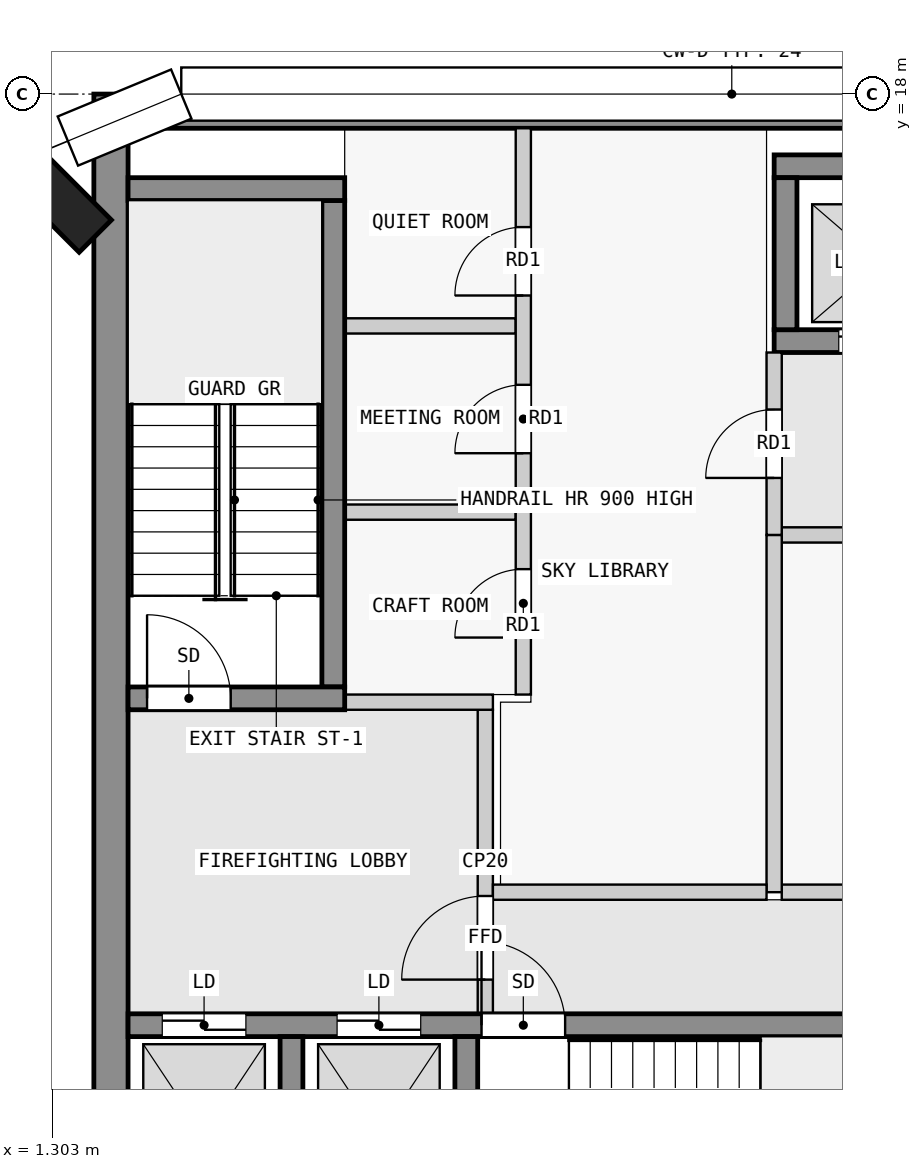
"""IFC4 building model, lengths in metres.
Left out: names, types, materials, properties, quantities, classifications, styles, units other than length and angle.
Written with IfcOpenShell. Run it as: python <this file> out.ifc"""

import sys

from ifc_helpers import new_model, si_unit, direction, frame, frame_2d, origin, origin_2d, place, context, subcontext, project, spatial, rectangle, extrude, element, fill, save


model = new_model("IFC4")
c1 = context("Model", 3, precision=1e-05, world=origin(), true_north=direction((0.0, 1.0)))
c2 = subcontext(c1, "Body", "Model", "MODEL_VIEW")
j1 = project(units=[si_unit("LENGTHUNIT", "METRE"), si_unit("PLANEANGLEUNIT", "RADIAN")], contexts=[c1])
p1 = place(None, origin())
s1 = spatial("IfcSite", under=j1, at=p1, CompositionType="ELEMENT")
p2 = place(p1, origin())
s2 = spatial("IfcBuilding", under=s1, at=p2, CompositionType="ELEMENT")
p3 = place(p2, frame((0.0, 0.0, 287.9)))
s3 = spatial("IfcBuildingStorey", under=s2, at=p3, CompositionType="ELEMENT", Elevation=287.9)
p4 = place(p3, frame((1.374, 16.626, 0.0), z_axis=(0.0, 0.0, 1.0), x_axis=(0.707106781187, 0.707106781187, 0.0)))
e1 = element("IfcColumn", 1, at=p4, inside=s3, PredefinedType="COLUMN", context=c2, shape_type="SweptSolid", body=[
    extrude(rectangle(XDim=0.6, YDim=1.4, at=origin_2d()), origin(), (0.0, 0.0, 1.0), 3.5),
])
p5 = place(p3, frame((1.85, 17.775, 0.0), z_axis=(0.0, 0.0, 1.0), x_axis=(1.0, 0.0, 0.0)))
e2 = element("IfcWall", 2, at=p5, inside=s3, PredefinedType="SHEAR", context=c2, shape_type="SweptSolid", body=[
    extrude(rectangle(XDim=20.65, YDim=0.45, at=frame_2d((10.325, 0.0))), origin(), (0.0, 0.0, 1.0), 3.25),
])
p6 = place(p3, frame((2.075, 2.5, 0.0), z_axis=(0.0, 0.0, 1.0), x_axis=(0.0, 1.0, 0.0)))
e3 = element("IfcWall", 3, at=p6, inside=s3, PredefinedType="SHEAR", context=c2, shape_type="SweptSolid", body=[
    extrude(rectangle(XDim=15.05, YDim=0.45, at=frame_2d((7.525, 0.0))), origin(), (0.0, 0.0, 1.0), 3.25),
])
for number, where, z_axis, x_axis in (
    (4, (4.45, 2.8, 0.0), (0.0, 0.0, 1.0), (0.0, 1.0, 0.0)),
    (5, (6.75, 2.8, 0.0), (0.0, 0.0, 1.0), (0.0, 1.0, 0.0)),
):
    element("IfcWall", number, at=place(p3, frame(where, z_axis=z_axis, x_axis=x_axis)), inside=s3, PredefinedType="SHEAR", context=c2, shape_type="SweptSolid", body=[
        extrude(rectangle(XDim=2.8, YDim=0.3, at=frame_2d((1.4, 0.0))), origin(), (0.0, 0.0, 1.0), 3.25),
    ])
p7 = place(p3, frame((2.3, 5.75, 0.0), z_axis=(0.0, 0.0, 1.0), x_axis=(1.0, 0.0, 0.0)))
e6 = element("IfcWall", 6, at=p7, inside=s3, PredefinedType="SHEAR", context=c2, shape_type="SweptSolid", body=[
    extrude(rectangle(XDim=18.8, YDim=0.3, at=frame_2d((9.4, 0.0))), origin(), (0.0, 0.0, 1.0), 3.25),
])
p8 = place(p7, frame((4.65, 0.0, 0.0)))
e7 = element("IfcOpeningElement", 7, at=p8, cuts=e6, PredefinedType="OPENING", context=c2, shape_type="SweptSolid", body=[
    extrude(rectangle(XDim=1.1, YDim=2.1, at=frame_2d((0.55, 1.05))), frame((0.0, 0.16, 0.0), z_axis=(0.0, -1.0, 0.0), x_axis=(1.0, 0.0, 0.0)), (0.0, 0.0, 1.0), 0.32),
])
p9 = place(p7, frame((0.45, 0.0, 0.0)))
e8 = element("IfcOpeningElement", 8, at=p9, cuts=e6, PredefinedType="OPENING", context=c2, shape_type="SweptSolid", body=[
    extrude(rectangle(XDim=1.1, YDim=2.1, at=frame_2d((0.55, 1.05))), frame((0.0, 0.16, 0.0), z_axis=(0.0, -1.0, 0.0), x_axis=(1.0, 0.0, 0.0)), (0.0, 0.0, 1.0), 0.32),
])
p10 = place(p7, frame((2.75, 0.0, 0.0)))
e9 = element("IfcOpeningElement", 9, at=p10, cuts=e6, PredefinedType="OPENING", context=c2, shape_type="SweptSolid", body=[
    extrude(rectangle(XDim=1.1, YDim=2.1, at=frame_2d((0.55, 1.05))), frame((0.0, 0.16, 0.0), z_axis=(0.0, -1.0, 0.0), x_axis=(1.0, 0.0, 0.0)), (0.0, 0.0, 1.0), 0.32),
])
p11 = place(p7, frame((14.45, 0.0, 0.0)))
e10 = element("IfcOpeningElement", 10, at=p11, cuts=e6, PredefinedType="OPENING", context=c2, shape_type="SweptSolid", body=[
    extrude(rectangle(XDim=0.9, YDim=2.1, at=frame_2d((0.45, 1.05))), frame((0.0, 0.16, 0.0), z_axis=(0.0, -1.0, 0.0), x_axis=(1.0, 0.0, 0.0)), (0.0, 0.0, 1.0), 0.32),
])
p12 = place(p3, frame((2.3, 10.05, 0.0), z_axis=(0.0, 0.0, 1.0), x_axis=(1.0, 0.0, 0.0)))
e11 = element("IfcWall", 11, at=p12, inside=s3, PredefinedType="SHEAR", context=c2, shape_type="SweptSolid", body=[
    extrude(rectangle(XDim=2.85, YDim=0.3, at=frame_2d((1.425, 0.0))), origin(), (0.0, 0.0, 1.0), 3.25),
])
p13 = place(p12, frame((0.25, 0.0, 0.0)))
e12 = element("IfcOpeningElement", 12, at=p13, cuts=e11, PredefinedType="OPENING", context=c2, shape_type="SweptSolid", body=[
    extrude(rectangle(XDim=1.1, YDim=2.1, at=frame_2d((0.55, 1.05))), frame((0.0, 0.16, 0.0), z_axis=(0.0, -1.0, 0.0), x_axis=(1.0, 0.0, 0.0)), (0.0, 0.0, 1.0), 0.32),
])
p14 = place(p3, frame((5.0, 10.2, 0.0), z_axis=(0.0, 0.0, 1.0), x_axis=(0.0, 1.0, 0.0)))
e13 = element("IfcWall", 13, at=p14, inside=s3, PredefinedType="SHEAR", context=c2, shape_type="SweptSolid", body=[
    extrude(rectangle(XDim=6.4, YDim=0.3, at=frame_2d((3.2, 0.0))), origin(), (0.0, 0.0, 1.0), 3.25),
])
p15 = place(p3, frame((2.3, 16.75, 0.0), z_axis=(0.0, 0.0, 1.0), x_axis=(1.0, 0.0, 0.0)))
e14 = element("IfcWall", 14, at=p15, inside=s3, PredefinedType="SHEAR", context=c2, shape_type="SweptSolid", body=[
    extrude(rectangle(XDim=2.85, YDim=0.3, at=frame_2d((1.425, 0.0))), origin(), (0.0, 0.0, 1.0), 3.25),
])
p16 = place(p3, frame((10.8, 17.05, 0.0), z_axis=(0.0, 0.0, 1.0), x_axis=(1.0, 0.0, 0.0)))
e15 = element("IfcWall", 15, at=p16, inside=s3, PredefinedType="SHEAR", context=c2, shape_type="SweptSolid", body=[
    extrude(rectangle(XDim=7.8, YDim=0.3, at=frame_2d((3.9, 0.0))), origin(), (0.0, 0.0, 1.0), 3.25),
])
p17 = place(p3, frame((10.8, 14.75, 0.0), z_axis=(0.0, 0.0, 1.0), x_axis=(1.0, 0.0, 0.0)))
e16 = element("IfcWall", 16, at=p17, inside=s3, PredefinedType="SHEAR", context=c2, shape_type="SweptSolid", body=[
    extrude(rectangle(XDim=7.8, YDim=0.3, at=frame_2d((3.9, 0.0))), origin(), (0.0, 0.0, 1.0), 3.25),
])
p18 = place(p17, frame((0.85, 0.0, 0.0)))
e17 = element("IfcOpeningElement", 17, at=p18, cuts=e16, PredefinedType="OPENING", context=c2, shape_type="SweptSolid", body=[
    extrude(rectangle(XDim=1.1, YDim=2.1, at=frame_2d((0.55, 1.05))), frame((0.0, 0.16, 0.0), z_axis=(0.0, -1.0, 0.0), x_axis=(1.0, 0.0, 0.0)), (0.0, 0.0, 1.0), 0.32),
])
p19 = place(p17, frame((3.35, 0.0, 0.0)))
e18 = element("IfcOpeningElement", 18, at=p19, cuts=e16, PredefinedType="OPENING", context=c2, shape_type="SweptSolid", body=[
    extrude(rectangle(XDim=1.1, YDim=2.1, at=frame_2d((0.55, 1.05))), frame((0.0, 0.16, 0.0), z_axis=(0.0, -1.0, 0.0), x_axis=(1.0, 0.0, 0.0)), (0.0, 0.0, 1.0), 0.32),
])
p20 = place(p17, frame((5.85, 0.0, 0.0)))
e19 = element("IfcOpeningElement", 19, at=p20, cuts=e16, PredefinedType="OPENING", context=c2, shape_type="SweptSolid", body=[
    extrude(rectangle(XDim=1.1, YDim=2.1, at=frame_2d((0.55, 1.05))), frame((0.0, 0.16, 0.0), z_axis=(0.0, -1.0, 0.0), x_axis=(1.0, 0.0, 0.0)), (0.0, 0.0, 1.0), 0.32),
])
p21 = place(p3, frame((10.95, 14.9, 0.0), z_axis=(0.0, 0.0, 1.0), x_axis=(0.0, 1.0, 0.0)))
e20 = element("IfcWall", 20, at=p21, inside=s3, PredefinedType="SHEAR", context=c2, shape_type="SweptSolid", body=[
    extrude(rectangle(XDim=2.0, YDim=0.3, at=frame_2d((1.0, 0.0))), origin(), (0.0, 0.0, 1.0), 3.25),
])
p22 = place(p3, frame((7.0, 5.9, 0.0), z_axis=(0.0, 0.0, 1.0), x_axis=(0.0, 1.0, 0.0)))
e21 = element("IfcWall", 21, at=p22, inside=s3, PredefinedType="PARTITIONING", context=c2, shape_type="SweptSolid", body=[
    extrude(rectangle(XDim=4.0, YDim=0.2, at=frame_2d((2.0, 0.0))), origin(), (0.0, 0.0, 1.0), 3.25),
])
p23 = place(p22, frame((0.45, 0.0, 0.0)))
e22 = element("IfcOpeningElement", 22, at=p23, cuts=e21, PredefinedType="OPENING", context=c2, shape_type="SweptSolid", body=[
    extrude(rectangle(XDim=1.1, YDim=2.1, at=frame_2d((0.55, 1.05))), frame((0.0, 0.11, 0.0), z_axis=(0.0, -1.0, 0.0), x_axis=(1.0, 0.0, 0.0)), (0.0, 0.0, 1.0), 0.22),
])
p24 = place(p3, frame((5.15, 10.0, 0.0), z_axis=(0.0, 0.0, 1.0), x_axis=(1.0, 0.0, 0.0)))
e23 = element("IfcWall", 23, at=p24, inside=s3, PredefinedType="PARTITIONING", context=c2, shape_type="SweptSolid", body=[
    extrude(rectangle(XDim=1.95, YDim=0.2, at=frame_2d((0.975, 0.0))), origin(), (0.0, 0.0, 1.0), 3.25),
])
p25 = place(p3, frame((7.1, 7.5, 0.0), z_axis=(0.0, 0.0, 1.0), x_axis=(1.0, 0.0, 0.0)))
e24 = element("IfcWall", 24, at=p25, inside=s3, PredefinedType="PARTITIONING", context=c2, shape_type="SweptSolid", body=[
    extrude(rectangle(XDim=3.6, YDim=0.2, at=frame_2d((1.8, 0.0))), origin(), (0.0, 0.0, 1.0), 3.25),
])
p26 = place(p3, frame((10.8, 12.2, 0.0), z_axis=(0.0, 0.0, 1.0), x_axis=(0.0, 1.0, 0.0)))
e25 = element("IfcWall", 25, at=p26, inside=s3, PredefinedType="PARTITIONING", context=c2, shape_type="SweptSolid", body=[
    extrude(rectangle(XDim=2.4, YDim=0.2, at=frame_2d((1.2, 0.0))), origin(), (0.0, 0.0, 1.0), 3.25),
])
p27 = place(p26, frame((0.75, 0.0, 0.0)))
e26 = element("IfcOpeningElement", 26, at=p27, cuts=e25, PredefinedType="OPENING", context=c2, shape_type="SweptSolid", body=[
    extrude(rectangle(XDim=0.9, YDim=2.1, at=frame_2d((0.45, 1.05))), frame((0.0, 0.11, 0.0), z_axis=(0.0, -1.0, 0.0), x_axis=(1.0, 0.0, 0.0)), (0.0, 0.0, 1.0), 0.22),
])
p28 = place(p3, frame((10.8, 7.5, 0.0), z_axis=(0.0, 0.0, 1.0), x_axis=(0.0, 1.0, 0.0)))
e27 = element("IfcWall", 27, at=p28, inside=s3, PredefinedType="PARTITIONING", context=c2, shape_type="SweptSolid", body=[
    extrude(rectangle(XDim=4.7, YDim=0.2, at=frame_2d((2.35, 0.0))), origin(), (0.0, 0.0, 1.0), 3.25),
])
p29 = place(p3, frame((10.9, 7.5, 0.0), z_axis=(0.0, 0.0, 1.0), x_axis=(1.0, 0.0, 0.0)))
e28 = element("IfcWall", 28, at=p29, inside=s3, PredefinedType="PARTITIONING", context=c2, shape_type="SweptSolid", body=[
    extrude(rectangle(XDim=6.25, YDim=0.2, at=frame_2d((3.125, 0.0))), origin(), (0.0, 0.0, 1.0), 3.25),
])
p30 = place(p3, frame((10.9, 12.2, 0.0), z_axis=(0.0, 0.0, 1.0), x_axis=(1.0, 0.0, 0.0)))
e29 = element("IfcWall", 29, at=p30, inside=s3, PredefinedType="PARTITIONING", context=c2, shape_type="SweptSolid", body=[
    extrude(rectangle(XDim=6.25, YDim=0.2, at=frame_2d((3.125, 0.0))), origin(), (0.0, 0.0, 1.0), 3.25),
])
p31 = place(p30, frame((2.675, 0.0, 0.0)))
e30 = element("IfcOpeningElement", 30, at=p31, cuts=e29, PredefinedType="OPENING", context=c2, shape_type="SweptSolid", body=[
    extrude(rectangle(XDim=0.9, YDim=2.1, at=frame_2d((0.45, 1.05))), frame((0.0, 0.11, 0.0), z_axis=(0.0, -1.0, 0.0), x_axis=(1.0, 0.0, 0.0)), (0.0, 0.0, 1.0), 0.22),
])
p32 = place(p3, frame((7.5, 10.1, 0.0), z_axis=(0.0, 0.0, 1.0), x_axis=(0.0, 1.0, 0.0)))
e31 = element("IfcWall", 31, at=p32, inside=s3, PredefinedType="PARTITIONING", context=c2, shape_type="SweptSolid", body=[
    extrude(rectangle(XDim=7.45, YDim=0.2, at=frame_2d((3.725, 0.0))), origin(), (0.0, 0.0, 1.0), 3.25),
])
p33 = place(p32, frame((0.75, 0.0, 0.0)))
e32 = element("IfcOpeningElement", 32, at=p33, cuts=e31, PredefinedType="OPENING", context=c2, shape_type="SweptSolid", body=[
    extrude(rectangle(XDim=0.9, YDim=2.1, at=frame_2d((0.45, 1.05))), frame((0.0, 0.11, 0.0), z_axis=(0.0, -1.0, 0.0), x_axis=(1.0, 0.0, 0.0)), (0.0, 0.0, 1.0), 0.22),
])
p34 = place(p32, frame((3.175, 0.0, 0.0)))
e33 = element("IfcOpeningElement", 33, at=p34, cuts=e31, PredefinedType="OPENING", context=c2, shape_type="SweptSolid", body=[
    extrude(rectangle(XDim=0.9, YDim=2.1, at=frame_2d((0.45, 1.05))), frame((0.0, 0.11, 0.0), z_axis=(0.0, -1.0, 0.0), x_axis=(1.0, 0.0, 0.0)), (0.0, 0.0, 1.0), 0.22),
])
p35 = place(p32, frame((5.25, 0.0, 0.0)))
e34 = element("IfcOpeningElement", 34, at=p35, cuts=e31, PredefinedType="OPENING", context=c2, shape_type="SweptSolid", body=[
    extrude(rectangle(XDim=0.9, YDim=2.1, at=frame_2d((0.45, 1.05))), frame((0.0, 0.11, 0.0), z_axis=(0.0, -1.0, 0.0), x_axis=(1.0, 0.0, 0.0)), (0.0, 0.0, 1.0), 0.22),
])
for number, where, z_axis, x_axis in (
    (35, (5.15, 12.5, 0.0), (0.0, 0.0, 1.0), (1.0, 0.0, 0.0)),
    (36, (5.15, 14.95, 0.0), (0.0, 0.0, 1.0), (1.0, 0.0, 0.0)),
):
    element("IfcWall", number, at=place(p3, frame(where, z_axis=z_axis, x_axis=x_axis)), inside=s3, PredefinedType="PARTITIONING", context=c2, shape_type="SweptSolid", body=[
        extrude(rectangle(XDim=2.25, YDim=0.2, at=frame_2d((1.125, 0.0))), origin(), (0.0, 0.0, 1.0), 3.25),
    ])
p36 = place(p23, origin())
e37 = element("IfcDoor", 37, at=p36, inside=s3, OperationType="SINGLE_SWING_LEFT", PredefinedType="DOOR", context=c2, shape_type="SweptSolid", body=[
    extrude(rectangle(XDim=1.1, YDim=2.1, at=frame_2d((0.55, 1.05))), frame((0.0, 0.025, 0.0), z_axis=(0.0, -1.0, 0.0), x_axis=(1.0, 0.0, 0.0)), (0.0, 0.0, 1.0), 0.05),
])
fill(e22, e37)
p37 = place(p13, origin())
e38 = element("IfcDoor", 38, at=p37, inside=s3, OperationType="SINGLE_SWING_RIGHT", PredefinedType="DOOR", context=c2, shape_type="SweptSolid", body=[
    extrude(rectangle(XDim=1.1, YDim=2.1, at=frame_2d((0.55, 1.05))), frame((0.0, 0.025, 0.0), z_axis=(0.0, -1.0, 0.0), x_axis=(1.0, 0.0, 0.0)), (0.0, 0.0, 1.0), 0.05),
])
fill(e12, e38)
p38 = place(p27, origin())
e39 = element("IfcDoor", 39, at=p38, inside=s3, OperationType="SINGLE_SWING_LEFT", PredefinedType="DOOR", context=c2, shape_type="SweptSolid", body=[
    extrude(rectangle(XDim=0.9, YDim=2.1, at=frame_2d((0.45, 1.05))), frame((0.0, 0.025, 0.0), z_axis=(0.0, -1.0, 0.0), x_axis=(1.0, 0.0, 0.0)), (0.0, 0.0, 1.0), 0.05),
])
fill(e26, e39)
p39 = place(p8, origin())
e40 = element("IfcDoor", 40, at=p39, inside=s3, OperationType="SINGLE_SWING_LEFT", PredefinedType="DOOR", context=c2, shape_type="SweptSolid", body=[
    extrude(rectangle(XDim=1.1, YDim=2.1, at=frame_2d((0.55, 1.05))), frame((0.0, 0.025, 0.0), z_axis=(0.0, -1.0, 0.0), x_axis=(1.0, 0.0, 0.0)), (0.0, 0.0, 1.0), 0.05),
])
fill(e7, e40)
p40 = place(p9, origin())
e41 = element("IfcDoor", 41, at=p40, inside=s3, OperationType="DOUBLE_DOOR_SLIDING", PredefinedType="DOOR", context=c2, shape_type="SweptSolid", body=[
    extrude(rectangle(XDim=1.1, YDim=2.1, at=frame_2d((0.55, 1.05))), frame((0.0, 0.025, 0.0), z_axis=(0.0, -1.0, 0.0), x_axis=(1.0, 0.0, 0.0)), (0.0, 0.0, 1.0), 0.05),
])
fill(e8, e41)
p41 = place(p10, origin())
e42 = element("IfcDoor", 42, at=p41, inside=s3, OperationType="DOUBLE_DOOR_SLIDING", PredefinedType="DOOR", context=c2, shape_type="SweptSolid", body=[
    extrude(rectangle(XDim=1.1, YDim=2.1, at=frame_2d((0.55, 1.05))), frame((0.0, 0.025, 0.0), z_axis=(0.0, -1.0, 0.0), x_axis=(1.0, 0.0, 0.0)), (0.0, 0.0, 1.0), 0.05),
])
fill(e9, e42)
p42 = place(p18, origin())
e43 = element("IfcDoor", 43, at=p42, inside=s3, OperationType="DOUBLE_DOOR_SLIDING", PredefinedType="DOOR", context=c2, shape_type="SweptSolid", body=[
    extrude(rectangle(XDim=1.1, YDim=2.1, at=frame_2d((0.55, 1.05))), frame((0.0, 0.025, 0.0), z_axis=(0.0, -1.0, 0.0), x_axis=(1.0, 0.0, 0.0)), (0.0, 0.0, 1.0), 0.05),
])
fill(e17, e43)
p43 = place(p33, origin())
e44 = element("IfcDoor", 44, at=p43, inside=s3, OperationType="SINGLE_SWING_RIGHT", PredefinedType="DOOR", context=c2, shape_type="SweptSolid", body=[
    extrude(rectangle(XDim=0.9, YDim=2.1, at=frame_2d((0.45, 1.05))), frame((0.0, 0.025, 0.0), z_axis=(0.0, -1.0, 0.0), x_axis=(1.0, 0.0, 0.0)), (0.0, 0.0, 1.0), 0.05),
])
fill(e32, e44)
p44 = place(p34, origin())
e45 = element("IfcDoor", 45, at=p44, inside=s3, OperationType="SINGLE_SWING_RIGHT", PredefinedType="DOOR", context=c2, shape_type="SweptSolid", body=[
    extrude(rectangle(XDim=0.9, YDim=2.1, at=frame_2d((0.45, 1.05))), frame((0.0, 0.025, 0.0), z_axis=(0.0, -1.0, 0.0), x_axis=(1.0, 0.0, 0.0)), (0.0, 0.0, 1.0), 0.05),
])
fill(e33, e45)
p45 = place(p35, origin())
e46 = element("IfcDoor", 46, at=p45, inside=s3, OperationType="SINGLE_SWING_RIGHT", PredefinedType="DOOR", context=c2, shape_type="SweptSolid", body=[
    extrude(rectangle(XDim=0.9, YDim=2.1, at=frame_2d((0.45, 1.05))), frame((0.0, 0.025, 0.0), z_axis=(0.0, -1.0, 0.0), x_axis=(1.0, 0.0, 0.0)), (0.0, 0.0, 1.0), 0.05),
])
fill(e34, e46)
save(model, sys.argv[1])
